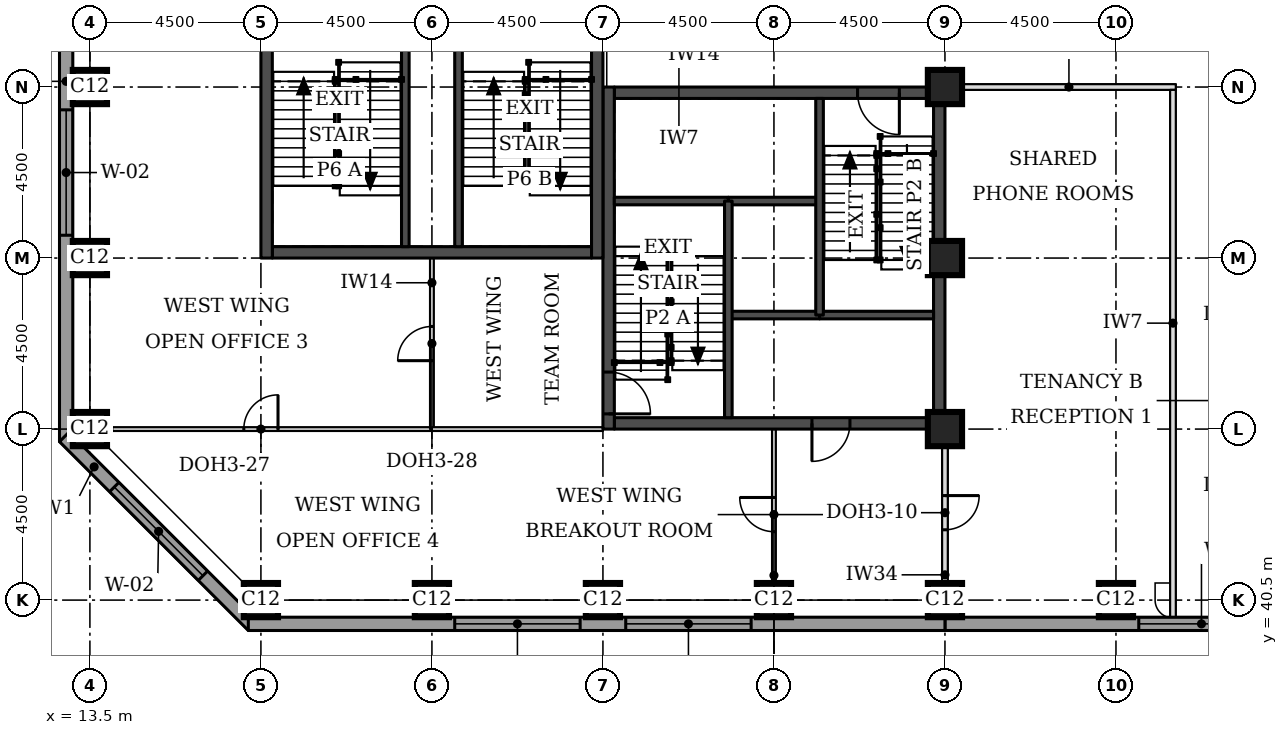
"""IFC4 building model, lengths in metres.
Left out: names, types, materials, properties, quantities, classifications, styles, units other than length and angle.
Written with IfcOpenShell. Run it as: python <this file> out.ifc"""

import sys

from ifc_helpers import new_model, si_unit, direction, frame, frame_2d, origin, origin_2d, place, context, subcontext, project, spatial, rectangle, extrude, element, fill, save


model = new_model("IFC4")
c1 = context("Model", 3, precision=1e-05, world=origin(), true_north=direction((0.0, 1.0)))
c2 = subcontext(c1, "Body", "Model", "MODEL_VIEW")
j1 = project(units=[si_unit("LENGTHUNIT", "METRE"), si_unit("PLANEANGLEUNIT", "RADIAN")], contexts=[c1])
p1 = place(None, origin())
s1 = spatial("IfcSite", under=j1, at=p1, CompositionType="ELEMENT")
p2 = place(p1, origin())
s2 = spatial("IfcBuilding", under=s1, at=p2, CompositionType="ELEMENT")
p3 = place(p2, frame((0.0, 0.0, 162.5)))
s3 = spatial("IfcBuildingStorey", under=s2, at=p3, CompositionType="ELEMENT", Elevation=162.5)
for number, where, z_axis, x_axis in (
    (1, (18.0, 40.5, 0.0), (0.0, 0.0, 1.0), (1.0, 0.0, 0.0)),
    (2, (22.5, 40.5, 0.0), (0.0, 0.0, 1.0), (1.0, 0.0, 0.0)),
    (3, (27.0, 40.5, 0.0), (0.0, 0.0, 1.0), (1.0, 0.0, 0.0)),
    (4, (31.5, 40.5, 0.0), (0.0, 0.0, 1.0), (1.0, 0.0, 0.0)),
    (5, (36.0, 40.5, 0.0), (0.0, 0.0, 1.0), (1.0, 0.0, 0.0)),
    (6, (40.5, 40.5, 0.0), (0.0, 0.0, 1.0), (1.0, 0.0, 0.0)),
    (7, (13.5, 45.0, 0.0), (0.0, 0.0, 1.0), (1.0, 0.0, 0.0)),
    (8, (36.0, 45.0, 0.0), (0.0, 0.0, 1.0), (1.0, 0.0, 0.0)),
    (9, (13.5, 49.5, 0.0), (0.0, 0.0, 1.0), (1.0, 0.0, 0.0)),
    (10, (36.0, 49.5, 0.0), (0.0, 0.0, 1.0), (1.0, 0.0, 0.0)),
    (11, (13.5, 54.0, 0.0), (0.0, 0.0, 1.0), (1.0, 0.0, 0.0)),
    (12, (36.0, 54.0, 0.0), (0.0, 0.0, 1.0), (1.0, 0.0, 0.0)),
):
    element("IfcColumn", number, at=place(p3, frame(where, z_axis=z_axis, x_axis=x_axis)), inside=s3, PredefinedType="COLUMN", context=c2, shape_type="SweptSolid", body=[
        extrude(rectangle(XDim=0.9, YDim=0.9, at=origin_2d()), origin(), (0.0, 0.0, 1.0), 3.7),
    ])
p4 = place(p3, frame((27.3, 45.15, 0.0), z_axis=(0.0, 0.0, 1.0), x_axis=(1.0, 0.0, 0.0)))
e13 = element("IfcWall", 13, at=p4, inside=s3, PredefinedType="SHEAR", context=c2, shape_type="SweptSolid", body=[
    extrude(rectangle(XDim=8.4, YDim=0.3, at=frame_2d((4.2, 0.0))), origin(), (0.0, 0.0, 1.0), 3.7),
])
p5 = place(p4, frame((5.2, 0.0, 0.0)))
e14 = element("IfcOpeningElement", 14, at=p5, cuts=e13, PredefinedType="OPENING", context=c2, shape_type="SweptSolid", body=[
    extrude(rectangle(XDim=1.0, YDim=2.1, at=frame_2d((0.5, 1.05))), frame((0.0, 0.16, 0.0), z_axis=(0.0, -1.0, 0.0), x_axis=(1.0, 0.0, 0.0)), (0.0, 0.0, 1.0), 0.32),
])
p6 = place(p3, frame((27.3, 53.85, 0.0), z_axis=(0.0, 0.0, 1.0), x_axis=(1.0, 0.0, 0.0)))
e15 = element("IfcWall", 15, at=p6, inside=s3, PredefinedType="SHEAR", context=c2, shape_type="SweptSolid", body=[
    extrude(rectangle(XDim=8.4, YDim=0.3, at=frame_2d((4.2, 0.0))), origin(), (0.0, 0.0, 1.0), 3.7),
])
p7 = place(p6, frame((6.4, 0.0, 0.0)))
e16 = element("IfcOpeningElement", 16, at=p7, cuts=e15, PredefinedType="OPENING", context=c2, shape_type="SweptSolid", body=[
    extrude(rectangle(XDim=1.1, YDim=2.1, at=frame_2d((0.55, 1.05))), frame((0.0, 0.16, 0.0), z_axis=(0.0, -1.0, 0.0), x_axis=(1.0, 0.0, 0.0)), (0.0, 0.0, 1.0), 0.32),
])
p8 = place(p3, frame((27.15, 45.0, 0.0), z_axis=(0.0, 0.0, 1.0), x_axis=(0.0, 1.0, 0.0)))
e17 = element("IfcWall", 17, at=p8, inside=s3, PredefinedType="SHEAR", context=c2, shape_type="SweptSolid", body=[
    extrude(rectangle(XDim=9.0, YDim=0.3, at=frame_2d((4.5, 0.0))), origin(), (0.0, 0.0, 1.0), 3.7),
])
p9 = place(p8, frame((0.4, 0.0, 0.0)))
e18 = element("IfcOpeningElement", 18, at=p9, cuts=e17, PredefinedType="OPENING", context=c2, shape_type="SweptSolid", body=[
    extrude(rectangle(XDim=1.1, YDim=2.1, at=frame_2d((0.55, 1.05))), frame((0.0, 0.16, 0.0), z_axis=(0.0, -1.0, 0.0), x_axis=(1.0, 0.0, 0.0)), (0.0, 0.0, 1.0), 0.32),
])
p10 = place(p3, frame((35.85, 45.0, 0.0), z_axis=(0.0, 0.0, 1.0), x_axis=(0.0, 1.0, 0.0)))
e19 = element("IfcWall", 19, at=p10, inside=s3, PredefinedType="SHEAR", context=c2, shape_type="SweptSolid", body=[
    extrude(rectangle(XDim=9.0, YDim=0.3, at=frame_2d((4.5, 0.0))), origin(), (0.0, 0.0, 1.0), 3.7),
])
p11 = place(p3, frame((18.3, 49.65, 0.0), z_axis=(0.0, 0.0, 1.0), x_axis=(1.0, 0.0, 0.0)))
e20 = element("IfcWall", 20, at=p11, inside=s3, PredefinedType="SHEAR", context=c2, shape_type="SweptSolid", body=[
    extrude(rectangle(XDim=8.4, YDim=0.3, at=frame_2d((4.2, 0.0))), origin(), (0.0, 0.0, 1.0), 3.7),
])
p12 = place(p3, frame((18.15, 49.5, 0.0), z_axis=(0.0, 0.0, 1.0), x_axis=(0.0, 1.0, 0.0)))
e21 = element("IfcWall", 21, at=p12, inside=s3, PredefinedType="SHEAR", context=c2, shape_type="SweptSolid", body=[
    extrude(rectangle(XDim=9.0, YDim=0.3, at=frame_2d((4.5, 0.0))), origin(), (0.0, 0.0, 1.0), 3.7),
])
p13 = place(p3, frame((26.85, 49.5, 0.0), z_axis=(0.0, 0.0, 1.0), x_axis=(0.0, 1.0, 0.0)))
e22 = element("IfcWall", 22, at=p13, inside=s3, PredefinedType="SHEAR", context=c2, shape_type="SweptSolid", body=[
    extrude(rectangle(XDim=9.0, YDim=0.3, at=frame_2d((4.5, 0.0))), origin(), (0.0, 0.0, 1.0), 3.7),
])
p14 = place(p13, frame((6.6, 0.0, 0.0)))
e23 = element("IfcOpeningElement", 23, at=p14, cuts=e22, PredefinedType="OPENING", context=c2, shape_type="SweptSolid", body=[
    extrude(rectangle(XDim=1.8, YDim=2.1, at=frame_2d((0.9, 1.05))), frame((0.0, 0.16, 0.0), z_axis=(0.0, -1.0, 0.0), x_axis=(1.0, 0.0, 0.0)), (0.0, 0.0, 1.0), 0.32),
])
p15 = place(p3, frame((36.0, 39.875, 0.0), z_axis=(0.0, 0.0, 1.0), x_axis=(1.0, 0.0, 0.0)))
e24 = element("IfcWall", 24, at=p15, inside=s3, PredefinedType="STANDARD", context=c2, shape_type="SweptSolid", body=[
    extrude(rectangle(XDim=36.331, YDim=0.35, at=frame_2d((18.166, 0.0))), origin(), (0.0, 0.0, 1.0), 3.525),
])
p16 = place(p15, frame((5.1, 0.0, 0.9)))
e25 = element("IfcOpeningElement", 25, at=p16, cuts=e24, PredefinedType="OPENING", context=c2, shape_type="SweptSolid", body=[
    extrude(rectangle(XDim=3.3, YDim=1.9, at=frame_2d((1.65, 0.95))), frame((0.0, 0.185, 0.0), z_axis=(0.0, -1.0, 0.0), x_axis=(1.0, 0.0, 0.0)), (0.0, 0.0, 1.0), 0.37),
])
p17 = place(p15, frame((9.6, 0.0, 0.9)))
e26 = element("IfcOpeningElement", 26, at=p17, cuts=e24, PredefinedType="OPENING", context=c2, shape_type="SweptSolid", body=[
    extrude(rectangle(XDim=3.3, YDim=1.9, at=frame_2d((1.65, 0.95))), frame((0.0, 0.185, 0.0), z_axis=(0.0, -1.0, 0.0), x_axis=(1.0, 0.0, 0.0)), (0.0, 0.0, 1.0), 0.37),
])
p18 = place(p15, frame((14.1, 0.0, 0.9)))
e27 = element("IfcOpeningElement", 27, at=p18, cuts=e24, PredefinedType="OPENING", context=c2, shape_type="SweptSolid", body=[
    extrude(rectangle(XDim=3.3, YDim=1.9, at=frame_2d((1.65, 0.95))), frame((0.0, 0.185, 0.0), z_axis=(0.0, -1.0, 0.0), x_axis=(1.0, 0.0, 0.0)), (0.0, 0.0, 1.0), 0.37),
])
p19 = place(p15, frame((18.6, 0.0, 0.9)))
e28 = element("IfcOpeningElement", 28, at=p19, cuts=e24, PredefinedType="OPENING", context=c2, shape_type="SweptSolid", body=[
    extrude(rectangle(XDim=3.3, YDim=1.9, at=frame_2d((1.65, 0.95))), frame((0.0, 0.185, 0.0), z_axis=(0.0, -1.0, 0.0), x_axis=(1.0, 0.0, 0.0)), (0.0, 0.0, 1.0), 0.37),
])
p20 = place(p15, frame((23.1, 0.0, 0.9)))
e29 = element("IfcOpeningElement", 29, at=p20, cuts=e24, PredefinedType="OPENING", context=c2, shape_type="SweptSolid", body=[
    extrude(rectangle(XDim=3.3, YDim=1.9, at=frame_2d((1.65, 0.95))), frame((0.0, 0.185, 0.0), z_axis=(0.0, -1.0, 0.0), x_axis=(1.0, 0.0, 0.0)), (0.0, 0.0, 1.0), 0.37),
])
p21 = place(p15, frame((27.6, 0.0, 0.9)))
e30 = element("IfcOpeningElement", 30, at=p21, cuts=e24, PredefinedType="OPENING", context=c2, shape_type="SweptSolid", body=[
    extrude(rectangle(XDim=3.3, YDim=1.9, at=frame_2d((1.65, 0.95))), frame((0.0, 0.185, 0.0), z_axis=(0.0, -1.0, 0.0), x_axis=(1.0, 0.0, 0.0)), (0.0, 0.0, 1.0), 0.37),
])
p22 = place(p3, frame((12.875, 58.831, 0.0), z_axis=(0.0, 0.0, 1.0), x_axis=(0.0, -1.0, 0.0)))
e31 = element("IfcWall", 31, at=p22, inside=s3, PredefinedType="STANDARD", context=c2, shape_type="SweptSolid", body=[
    extrude(rectangle(XDim=14.163, YDim=0.35, at=frame_2d((7.081, 0.0))), origin(), (0.0, 0.0, 1.0), 3.525),
])
p23 = place(p22, frame((5.431, 0.0, 0.9)))
e32 = element("IfcOpeningElement", 32, at=p23, cuts=e31, PredefinedType="OPENING", context=c2, shape_type="SweptSolid", body=[
    extrude(rectangle(XDim=3.3, YDim=1.9, at=frame_2d((1.65, 0.95))), frame((0.0, 0.185, 0.0), z_axis=(0.0, -1.0, 0.0), x_axis=(1.0, 0.0, 0.0)), (0.0, 0.0, 1.0), 0.37),
])
p24 = place(p3, frame((12.824, 44.792, 0.0), z_axis=(0.0, 0.0, 1.0), x_axis=(0.707106781187, -0.707106781187, 0.0)))
e33 = element("IfcWall", 33, at=p24, inside=s3, PredefinedType="STANDARD", context=c2, shape_type="SweptSolid", body=[
    extrude(rectangle(XDim=7.027, YDim=0.35, at=frame_2d((3.513, 0.0))), origin(), (0.0, 0.0, 1.0), 3.525),
])
p25 = place(p24, frame((1.863, 0.0, 0.9)))
e34 = element("IfcOpeningElement", 34, at=p25, cuts=e33, PredefinedType="OPENING", context=c2, shape_type="SweptSolid", body=[
    extrude(rectangle(XDim=3.3, YDim=1.9, at=frame_2d((1.65, 0.95))), frame((0.0, 0.185, 0.0), z_axis=(0.0, -1.0, 0.0), x_axis=(1.0, 0.0, 0.0)), (0.0, 0.0, 1.0), 0.37),
])
p26 = place(p3, frame((17.669, 39.875, 0.0), z_axis=(0.0, 0.0, 1.0), x_axis=(1.0, 0.0, 0.0)))
e35 = element("IfcWall", 35, at=p26, inside=s3, PredefinedType="STANDARD", context=c2, shape_type="SweptSolid", body=[
    extrude(rectangle(XDim=18.331, YDim=0.35, at=frame_2d((9.166, 0.0))), origin(), (0.0, 0.0, 1.0), 3.525),
])
p27 = place(p26, frame((5.431, 0.0, 0.9)))
e36 = element("IfcOpeningElement", 36, at=p27, cuts=e35, PredefinedType="OPENING", context=c2, shape_type="SweptSolid", body=[
    extrude(rectangle(XDim=3.3, YDim=1.9, at=frame_2d((1.65, 0.95))), frame((0.0, 0.185, 0.0), z_axis=(0.0, -1.0, 0.0), x_axis=(1.0, 0.0, 0.0)), (0.0, 0.0, 1.0), 0.37),
])
p28 = place(p26, frame((9.931, 0.0, 0.9)))
e37 = element("IfcOpeningElement", 37, at=p28, cuts=e35, PredefinedType="OPENING", context=c2, shape_type="SweptSolid", body=[
    extrude(rectangle(XDim=3.3, YDim=1.9, at=frame_2d((1.65, 0.95))), frame((0.0, 0.185, 0.0), z_axis=(0.0, -1.0, 0.0), x_axis=(1.0, 0.0, 0.0)), (0.0, 0.0, 1.0), 0.37),
])
p29 = place(p3, frame((36.45, 54.0, 0.0), z_axis=(0.0, 0.0, 1.0), x_axis=(1.0, 0.0, 0.0)))
e38 = element("IfcWall", 38, at=p29, inside=s3, PredefinedType="PARTITIONING", context=c2, shape_type="SweptSolid", body=[
    extrude(rectangle(XDim=5.625, YDim=0.15, at=frame_2d((2.812, 0.0))), origin(), (0.0, 0.0, 1.0), 3.55),
])
p30 = place(p3, frame((42.0, 40.05, 0.0), z_axis=(0.0, 0.0, 1.0), x_axis=(0.0, 1.0, 0.0)))
e39 = element("IfcWall", 39, at=p30, inside=s3, PredefinedType="PARTITIONING", context=c2, shape_type="SweptSolid", body=[
    extrude(rectangle(XDim=13.875, YDim=0.15, at=frame_2d((6.938, 0.0))), origin(), (0.0, 0.0, 1.0), 3.55),
])
p31 = place(p3, frame((36.0, 40.95, 0.0), z_axis=(0.0, 0.0, 1.0), x_axis=(0.0, 1.0, 0.0)))
e40 = element("IfcWall", 40, at=p31, inside=s3, PredefinedType="PARTITIONING", context=c2, shape_type="SweptSolid", body=[
    extrude(rectangle(XDim=3.63, YDim=0.15, at=frame_2d((1.815, 0.0))), origin(), (0.0, 0.0, 1.0), 2.8),
])
p32 = place(p31, frame((1.4, 0.0, 0.0)))
e41 = element("IfcOpeningElement", 41, at=p32, cuts=e40, PredefinedType="OPENING", context=c2, shape_type="SweptSolid", body=[
    extrude(rectangle(XDim=0.9, YDim=2.1, at=frame_2d((0.45, 1.05))), frame((0.0, 0.085, 0.0), z_axis=(0.0, -1.0, 0.0), x_axis=(1.0, 0.0, 0.0)), (0.0, 0.0, 1.0), 0.17),
])
p33 = place(p3, frame((22.5, 45.0, 0.0), z_axis=(0.0, 0.0, 1.0), x_axis=(-1.0, 0.0, 0.0)))
e42 = element("IfcWall", 42, at=p33, inside=s3, PredefinedType="PARTITIONING", context=c2, shape_type="SweptSolid", body=[
    extrude(rectangle(XDim=9.0, YDim=0.1, at=frame_2d((4.5, 0.0))), origin(), (0.0, 0.0, 1.0), 2.55),
])
p34 = place(p33, frame((4.05, 0.0, 0.0)))
e43 = element("IfcOpeningElement", 43, at=p34, cuts=e42, PredefinedType="OPENING", context=c2, shape_type="SweptSolid", body=[
    extrude(rectangle(XDim=0.9, YDim=2.1, at=frame_2d((0.45, 1.05))), frame((0.0, 0.06, 0.0), z_axis=(0.0, -1.0, 0.0), x_axis=(1.0, 0.0, 0.0)), (0.0, 0.0, 1.0), 0.12),
])
p35 = place(p3, frame((22.5, 49.5, 0.0), z_axis=(0.0, 0.0, 1.0), x_axis=(0.0, -1.0, 0.0)))
e44 = element("IfcWall", 44, at=p35, inside=s3, PredefinedType="PARTITIONING", context=c2, shape_type="SweptSolid", body=[
    extrude(rectangle(XDim=4.5, YDim=0.1, at=frame_2d((2.25, 0.0))), origin(), (0.0, 0.0, 1.0), 3.55),
])
p36 = place(p35, frame((1.8, 0.0, 0.0)))
e45 = element("IfcOpeningElement", 45, at=p36, cuts=e44, PredefinedType="OPENING", context=c2, shape_type="SweptSolid", body=[
    extrude(rectangle(XDim=0.9, YDim=2.1, at=frame_2d((0.45, 1.05))), frame((0.0, 0.06, 0.0), z_axis=(0.0, -1.0, 0.0), x_axis=(1.0, 0.0, 0.0)), (0.0, 0.0, 1.0), 0.12),
])
p37 = place(p3, frame((22.5, 45.0, 0.0), z_axis=(0.0, 0.0, 1.0), x_axis=(1.0, 0.0, 0.0)))
e46 = element("IfcWall", 46, at=p37, inside=s3, PredefinedType="PARTITIONING", context=c2, shape_type="SweptSolid", body=[
    extrude(rectangle(XDim=4.5, YDim=0.1, at=frame_2d((2.25, 0.0))), origin(), (0.0, 0.0, 1.0), 2.55),
])
p38 = place(p3, frame((31.5, 45.0, 0.0), z_axis=(0.0, 0.0, 1.0), x_axis=(0.0, -1.0, 0.0)))
e47 = element("IfcWall", 47, at=p38, inside=s3, PredefinedType="PARTITIONING", context=c2, shape_type="SweptSolid", body=[
    extrude(rectangle(XDim=4.5, YDim=0.1, at=frame_2d((2.25, 0.0))), origin(), (0.0, 0.0, 1.0), 3.55),
])
p39 = place(p38, frame((1.8, 0.0, 0.0)))
e48 = element("IfcOpeningElement", 48, at=p39, cuts=e47, PredefinedType="OPENING", context=c2, shape_type="SweptSolid", body=[
    extrude(rectangle(XDim=0.9, YDim=2.1, at=frame_2d((0.45, 1.05))), frame((0.0, 0.06, 0.0), z_axis=(0.0, -1.0, 0.0), x_axis=(1.0, 0.0, 0.0)), (0.0, 0.0, 1.0), 0.12),
])
p40 = place(p3, frame((30.3, 48.0, 0.0), z_axis=(0.0, 0.0, 1.0), x_axis=(1.0, 0.0, 0.0)))
e49 = element("IfcWall", 49, at=p40, inside=s3, PredefinedType="SOLIDWALL", context=c2, shape_type="SweptSolid", body=[
    extrude(rectangle(XDim=2.4, YDim=0.2, at=frame_2d((1.2, 0.0))), origin(), (0.0, 0.0, 1.0), 3.55),
])
p41 = place(p3, frame((32.7, 48.0, 0.0), z_axis=(0.0, 0.0, 1.0), x_axis=(1.0, 0.0, 0.0)))
e50 = element("IfcWall", 50, at=p41, inside=s3, PredefinedType="SOLIDWALL", context=c2, shape_type="SweptSolid", body=[
    extrude(rectangle(XDim=3.0, YDim=0.2, at=frame_2d((1.5, 0.0))), origin(), (0.0, 0.0, 1.0), 3.55),
])
p42 = place(p3, frame((30.3, 51.0, 0.0), z_axis=(0.0, 0.0, 1.0), x_axis=(1.0, 0.0, 0.0)))
e51 = element("IfcWall", 51, at=p42, inside=s3, PredefinedType="SOLIDWALL", context=c2, shape_type="SweptSolid", body=[
    extrude(rectangle(XDim=2.4, YDim=0.2, at=frame_2d((1.2, 0.0))), origin(), (0.0, 0.0, 1.0), 3.7),
])
p43 = place(p3, frame((27.3, 51.0, 0.0), z_axis=(0.0, 0.0, 1.0), x_axis=(1.0, 0.0, 0.0)))
e52 = element("IfcWall", 52, at=p43, inside=s3, PredefinedType="SOLIDWALL", context=c2, shape_type="SweptSolid", body=[
    extrude(rectangle(XDim=3.0, YDim=0.2, at=frame_2d((1.5, 0.0))), origin(), (0.0, 0.0, 1.0), 3.55),
])
for number, where, z_axis, x_axis in (
    (53, (30.3, 45.3, 0.0), (0.0, 0.0, 1.0), (0.0, 1.0, 0.0)),
    (54, (32.7, 48.0, 0.0), (0.0, 0.0, 1.0), (0.0, 1.0, 0.0)),
):
    element("IfcWall", number, at=place(p3, frame(where, z_axis=z_axis, x_axis=x_axis)), inside=s3, PredefinedType="SOLIDWALL", context=c2, shape_type="SweptSolid", body=[
        extrude(rectangle(XDim=5.7, YDim=0.2, at=frame_2d((2.85, 0.0))), origin(), (0.0, 0.0, 1.0), 3.55),
    ])
for number, where, z_axis, x_axis in (
    (55, (21.8, 49.8, 0.0), (0.0, 0.0, 1.0), (0.0, 1.0, 0.0)),
    (56, (23.2, 49.8, 0.0), (0.0, 0.0, 1.0), (0.0, 1.0, 0.0)),
):
    element("IfcWall", number, at=place(p3, frame(where, z_axis=z_axis, x_axis=x_axis)), inside=s3, PredefinedType="SOLIDWALL", context=c2, shape_type="SweptSolid", body=[
        extrude(rectangle(XDim=6.05, YDim=0.2, at=frame_2d((3.025, 0.0))), origin(), (0.0, 0.0, 1.0), 3.55),
    ])
p44 = place(p16, origin())
e57 = element("IfcWindow", 57, at=p44, inside=s3, PartitioningType="SINGLE_PANEL", PredefinedType="WINDOW", context=c2, shape_type="SweptSolid", body=[
    extrude(rectangle(XDim=3.3, YDim=1.9, at=frame_2d((1.65, 0.95))), frame((0.0, 0.085, 0.0), z_axis=(0.0, -1.0, 0.0), x_axis=(1.0, 0.0, 0.0)), (0.0, 0.0, 1.0), 0.06),
])
fill(e25, e57)
p45 = place(p23, origin())
e58 = element("IfcWindow", 58, at=p45, inside=s3, PartitioningType="SINGLE_PANEL", PredefinedType="WINDOW", context=c2, shape_type="SweptSolid", body=[
    extrude(rectangle(XDim=3.3, YDim=1.9, at=frame_2d((1.65, 0.95))), frame((0.0, 0.085, 0.0), z_axis=(0.0, -1.0, 0.0), x_axis=(1.0, 0.0, 0.0)), (0.0, 0.0, 1.0), 0.06),
])
fill(e32, e58)
p46 = place(p25, origin())
e59 = element("IfcWindow", 59, at=p46, inside=s3, PartitioningType="SINGLE_PANEL", PredefinedType="WINDOW", context=c2, shape_type="SweptSolid", body=[
    extrude(rectangle(XDim=3.3, YDim=1.9, at=frame_2d((1.65, 0.95))), frame((0.0, 0.085, 0.0), z_axis=(0.0, -1.0, 0.0), x_axis=(1.0, 0.0, 0.0)), (0.0, 0.0, 1.0), 0.06),
])
fill(e34, e59)
p47 = place(p27, origin())
e60 = element("IfcWindow", 60, at=p47, inside=s3, PartitioningType="SINGLE_PANEL", PredefinedType="WINDOW", context=c2, shape_type="SweptSolid", body=[
    extrude(rectangle(XDim=3.3, YDim=1.9, at=frame_2d((1.65, 0.95))), frame((0.0, 0.085, 0.0), z_axis=(0.0, -1.0, 0.0), x_axis=(1.0, 0.0, 0.0)), (0.0, 0.0, 1.0), 0.06),
])
fill(e36, e60)
p48 = place(p28, origin())
e61 = element("IfcWindow", 61, at=p48, inside=s3, PartitioningType="SINGLE_PANEL", PredefinedType="WINDOW", context=c2, shape_type="SweptSolid", body=[
    extrude(rectangle(XDim=3.3, YDim=1.9, at=frame_2d((1.65, 0.95))), frame((0.0, 0.085, 0.0), z_axis=(0.0, -1.0, 0.0), x_axis=(1.0, 0.0, 0.0)), (0.0, 0.0, 1.0), 0.06),
])
fill(e37, e61)
p49 = place(p32, frame((0.9, 0.0, 0.0), z_axis=(0.0, 0.0, 1.0), x_axis=(-1.0, 0.0, 0.0)))
e62 = element("IfcDoor", 62, at=p49, inside=s3, OperationType="SINGLE_SWING_LEFT", PredefinedType="DOOR", context=c2, shape_type="SweptSolid", body=[
    extrude(rectangle(XDim=0.9, YDim=2.1, at=frame_2d((0.45, 1.05))), frame((0.0, 0.025, 0.0), z_axis=(0.0, -1.0, 0.0), x_axis=(1.0, 0.0, 0.0)), (0.0, 0.0, 1.0), 0.05),
])
fill(e41, e62)
p50 = place(p34, frame((0.9, 0.0, 0.0), z_axis=(0.0, 0.0, 1.0), x_axis=(-1.0, 0.0, 0.0)))
e63 = element("IfcDoor", 63, at=p50, inside=s3, OperationType="SINGLE_SWING_RIGHT", PredefinedType="DOOR", context=c2, shape_type="SweptSolid", body=[
    extrude(rectangle(XDim=0.9, YDim=2.1, at=frame_2d((0.45, 1.05))), frame((0.0, 0.025, 0.0), z_axis=(0.0, -1.0, 0.0), x_axis=(1.0, 0.0, 0.0)), (0.0, 0.0, 1.0), 0.05),
])
fill(e43, e63)
p51 = place(p36, frame((0.9, 0.0, 0.0), z_axis=(0.0, 0.0, 1.0), x_axis=(-1.0, 0.0, 0.0)))
e64 = element("IfcDoor", 64, at=p51, inside=s3, OperationType="SINGLE_SWING_LEFT", PredefinedType="DOOR", context=c2, shape_type="SweptSolid", body=[
    extrude(rectangle(XDim=0.9, YDim=2.1, at=frame_2d((0.45, 1.05))), frame((0.0, 0.025, 0.0), z_axis=(0.0, -1.0, 0.0), x_axis=(1.0, 0.0, 0.0)), (0.0, 0.0, 1.0), 0.05),
])
fill(e45, e64)
p52 = place(p39, frame((0.9, 0.0, 0.0), z_axis=(0.0, 0.0, 1.0), x_axis=(-1.0, 0.0, 0.0)))
e65 = element("IfcDoor", 65, at=p52, inside=s3, OperationType="SINGLE_SWING_RIGHT", PredefinedType="DOOR", context=c2, shape_type="SweptSolid", body=[
    extrude(rectangle(XDim=0.9, YDim=2.1, at=frame_2d((0.45, 1.05))), frame((0.0, 0.025, 0.0), z_axis=(0.0, -1.0, 0.0), x_axis=(1.0, 0.0, 0.0)), (0.0, 0.0, 1.0), 0.05),
])
fill(e48, e65)
p53 = place(p9, frame((1.1, 0.0, 0.0), z_axis=(0.0, 0.0, 1.0), x_axis=(-1.0, 0.0, 0.0)))
e66 = element("IfcDoor", 66, at=p53, inside=s3, OperationType="SINGLE_SWING_RIGHT", PredefinedType="DOOR", context=c2, shape_type="SweptSolid", body=[
    extrude(rectangle(XDim=1.1, YDim=2.1, at=frame_2d((0.55, 1.05))), frame((0.0, 0.025, 0.0), z_axis=(0.0, -1.0, 0.0), x_axis=(1.0, 0.0, 0.0)), (0.0, 0.0, 1.0), 0.05),
])
fill(e18, e66)
p54 = place(p7, frame((1.1, 0.0, 0.0), z_axis=(0.0, 0.0, 1.0), x_axis=(-1.0, 0.0, 0.0)))
e67 = element("IfcDoor", 67, at=p54, inside=s3, OperationType="SINGLE_SWING_LEFT", PredefinedType="DOOR", context=c2, shape_type="SweptSolid", body=[
    extrude(rectangle(XDim=1.1, YDim=2.1, at=frame_2d((0.55, 1.05))), frame((0.0, 0.025, 0.0), z_axis=(0.0, -1.0, 0.0), x_axis=(1.0, 0.0, 0.0)), (0.0, 0.0, 1.0), 0.05),
])
fill(e16, e67)
p55 = place(p5, frame((1.0, 0.0, 0.0), z_axis=(0.0, 0.0, 1.0), x_axis=(-1.0, 0.0, 0.0)))
e68 = element("IfcDoor", 68, at=p55, inside=s3, OperationType="SINGLE_SWING_RIGHT", PredefinedType="DOOR", context=c2, shape_type="SweptSolid", body=[
    extrude(rectangle(XDim=1.0, YDim=2.1, at=frame_2d((0.5, 1.05))), frame((0.0, 0.025, 0.0), z_axis=(0.0, -1.0, 0.0), x_axis=(1.0, 0.0, 0.0)), (0.0, 0.0, 1.0), 0.05),
])
fill(e14, e68)
save(model, sys.argv[1])
